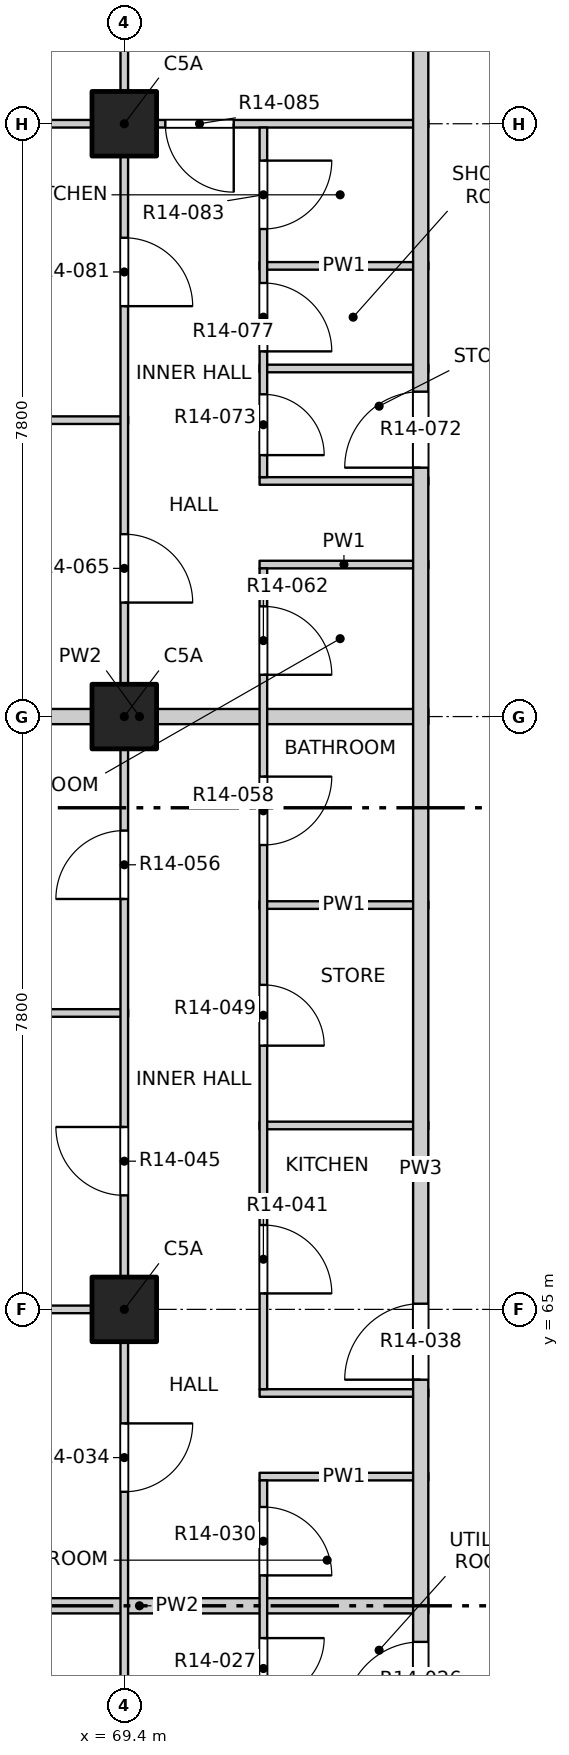
"""IFC4 building model, lengths in metres.
Left out: names, types, materials, properties, quantities, classifications, styles, units other than length and angle.
Written with IfcOpenShell. Run it as: python <this file> out.ifc"""

import sys

from ifc_helpers import new_model, si_unit, direction, frame, frame_2d, origin, origin_2d, place, context, subcontext, project, spatial, rectangle, extrude, element, fill, save


model = new_model("IFC4")
c1 = context("Model", 3, precision=1e-05, world=origin(), true_north=direction((0.0, 1.0)))
c2 = subcontext(c1, "Body", "Model", "MODEL_VIEW")
j1 = project(units=[si_unit("LENGTHUNIT", "METRE"), si_unit("PLANEANGLEUNIT", "RADIAN")], contexts=[c1])
p1 = place(None, origin())
s1 = spatial("IfcSite", under=j1, at=p1, CompositionType="ELEMENT")
p2 = place(p1, origin())
s2 = spatial("IfcBuilding", under=s1, at=p2, CompositionType="ELEMENT")
p3 = place(p2, frame((0.0, 0.0, 155.4)))
s3 = spatial("IfcBuildingStorey", under=s2, at=p3, CompositionType="ELEMENT", Elevation=155.4)
for number, where, z_axis, x_axis in (
    (1, (69.4, 65.0, -0.25), (0.0, 0.0, 1.0), (1.0, 0.0, 0.0)),
    (2, (69.4, 72.8, -0.25), (0.0, 0.0, 1.0), (1.0, 0.0, 0.0)),
    (3, (69.4, 80.6, -0.25), (0.0, 0.0, 1.0), (1.0, 0.0, 0.0)),
):
    element("IfcColumn", number, at=place(p3, frame(where, z_axis=z_axis, x_axis=x_axis)), inside=s3, PredefinedType="COLUMN", context=c2, shape_type="SweptSolid", body=[
        extrude(rectangle(XDim=0.85, YDim=0.85, at=origin_2d()), origin(), (0.0, 0.0, 1.0), 3.4),
    ])
p4 = place(p3, frame((65.8, 61.1, 0.0), z_axis=(0.0, 0.0, 1.0), x_axis=(1.0, 0.0, 0.0)))
e4 = element("IfcWall", 4, at=p4, inside=s3, PredefinedType="PARTITIONING", context=c2, shape_type="SweptSolid", body=[
    extrude(rectangle(XDim=7.6, YDim=0.2, at=frame_2d((3.8, 0.0))), origin(), (0.0, 0.0, 1.0), 2.55),
])
for number, where, z_axis, x_axis in (
    (5, (71.18, 62.8, 0.0), (0.0, 0.0, 1.0), (1.0, 0.0, 0.0)),
    (6, (71.18, 63.9, 0.0), (0.0, 0.0, 1.0), (1.0, 0.0, 0.0)),
):
    element("IfcWall", number, at=place(p3, frame(where, z_axis=z_axis, x_axis=x_axis)), inside=s3, PredefinedType="PARTITIONING", context=c2, shape_type="SweptSolid", body=[
        extrude(rectangle(XDim=2.22, YDim=0.1, at=frame_2d((1.11, 0.0))), origin(), (0.0, 0.0, 1.0), 3.15),
    ])
p5 = place(p3, frame((65.8, 65.0, 0.0), z_axis=(0.0, 0.0, 1.0), x_axis=(1.0, 0.0, 0.0)))
e7 = element("IfcWall", 7, at=p5, inside=s3, PredefinedType="PARTITIONING", context=c2, shape_type="SweptSolid", body=[
    extrude(rectangle(XDim=3.65, YDim=0.1, at=frame_2d((1.825, 0.0))), origin(), (0.0, 0.0, 1.0), 3.15),
])
p6 = place(p3, frame((71.18, 67.42, 0.0), z_axis=(0.0, 0.0, 1.0), x_axis=(1.0, 0.0, 0.0)))
e8 = element("IfcWall", 8, at=p6, inside=s3, PredefinedType="PARTITIONING", context=c2, shape_type="SweptSolid", body=[
    extrude(rectangle(XDim=2.22, YDim=0.1, at=frame_2d((1.11, 0.0))), origin(), (0.0, 0.0, 1.0), 3.15),
])
p7 = place(p3, frame((65.8, 68.9, 0.0), z_axis=(0.0, 0.0, 1.0), x_axis=(1.0, 0.0, 0.0)))
e9 = element("IfcWall", 9, at=p7, inside=s3, PredefinedType="PARTITIONING", context=c2, shape_type="SweptSolid", body=[
    extrude(rectangle(XDim=3.65, YDim=0.1, at=frame_2d((1.825, 0.0))), origin(), (0.0, 0.0, 1.0), 2.55),
])
p8 = place(p3, frame((71.18, 70.32, 0.0), z_axis=(0.0, 0.0, 1.0), x_axis=(1.0, 0.0, 0.0)))
e10 = element("IfcWall", 10, at=p8, inside=s3, PredefinedType="PARTITIONING", context=c2, shape_type="SweptSolid", body=[
    extrude(rectangle(XDim=2.22, YDim=0.1, at=frame_2d((1.11, 0.0))), origin(), (0.0, 0.0, 1.0), 3.15),
])
p9 = place(p3, frame((65.8, 72.8, 0.0), z_axis=(0.0, 0.0, 1.0), x_axis=(1.0, 0.0, 0.0)))
e11 = element("IfcWall", 11, at=p9, inside=s3, PredefinedType="PARTITIONING", context=c2, shape_type="SweptSolid", body=[
    extrude(rectangle(XDim=7.6, YDim=0.2, at=frame_2d((3.8, 0.0))), origin(), (0.0, 0.0, 1.0), 3.15),
])
for number, where, z_axis, x_axis in (
    (12, (71.18, 74.8, 0.0), (0.0, 0.0, 1.0), (1.0, 0.0, 0.0)),
    (13, (71.18, 75.9, 0.0), (0.0, 0.0, 1.0), (1.0, 0.0, 0.0)),
):
    element("IfcWall", number, at=place(p3, frame(where, z_axis=z_axis, x_axis=x_axis)), inside=s3, PredefinedType="PARTITIONING", context=c2, shape_type="SweptSolid", body=[
        extrude(rectangle(XDim=2.22, YDim=0.1, at=frame_2d((1.11, 0.0))), origin(), (0.0, 0.0, 1.0), 3.15),
    ])
p10 = place(p3, frame((65.8, 76.7, 0.0), z_axis=(0.0, 0.0, 1.0), x_axis=(1.0, 0.0, 0.0)))
e14 = element("IfcWall", 14, at=p10, inside=s3, PredefinedType="PARTITIONING", context=c2, shape_type="SweptSolid", body=[
    extrude(rectangle(XDim=3.65, YDim=0.1, at=frame_2d((1.825, 0.0))), origin(), (0.0, 0.0, 1.0), 2.55),
])
for number, where, z_axis, x_axis in (
    (15, (71.18, 77.38, 0.0), (0.0, 0.0, 1.0), (1.0, 0.0, 0.0)),
    (16, (71.18, 78.73, 0.0), (0.0, 0.0, 1.0), (1.0, 0.0, 0.0)),
):
    element("IfcWall", number, at=place(p3, frame(where, z_axis=z_axis, x_axis=x_axis)), inside=s3, PredefinedType="PARTITIONING", context=c2, shape_type="SweptSolid", body=[
        extrude(rectangle(XDim=2.22, YDim=0.1, at=frame_2d((1.11, 0.0))), origin(), (0.0, 0.0, 1.0), 3.15),
    ])
p11 = place(p3, frame((65.8, 80.6, 0.0), z_axis=(0.0, 0.0, 1.0), x_axis=(1.0, 0.0, 0.0)))
e17 = element("IfcWall", 17, at=p11, inside=s3, PredefinedType="PARTITIONING", context=c2, shape_type="SweptSolid", body=[
    extrude(rectangle(XDim=7.6, YDim=0.1, at=frame_2d((3.8, 0.0))), origin(), (0.0, 0.0, 1.0), 3.15),
])
p12 = place(p11, frame((4.14, 0.0, 0.0)))
e18 = element("IfcOpeningElement", 18, at=p12, cuts=e17, PredefinedType="OPENING", context=c2, shape_type="SweptSolid", body=[
    extrude(rectangle(XDim=0.9, YDim=2.1, at=frame_2d((0.45, 1.05))), frame((0.0, 0.06, 0.0), z_axis=(0.0, -1.0, 0.0), x_axis=(1.0, 0.0, 0.0)), (0.0, 0.0, 1.0), 0.12),
])
p13 = place(p3, frame((69.4, 45.8, 0.0), z_axis=(0.0, 0.0, 1.0), x_axis=(0.0, 1.0, 0.0)))
e19 = element("IfcWall", 19, at=p13, inside=s3, PredefinedType="PARTITIONING", context=c2, shape_type="SweptSolid", body=[
    extrude(rectangle(XDim=38.4, YDim=0.1, at=frame_2d((19.2, 0.0))), origin(), (0.0, 0.0, 1.0), 3.15),
])
p14 = place(p13, frame((1.05, 0.0, 0.0)))
e20 = element("IfcOpeningElement", 20, at=p14, cuts=e19, PredefinedType="OPENING", context=c2, shape_type="SweptSolid", body=[
    extrude(rectangle(XDim=1.2, YDim=2.1, at=frame_2d((0.6, 1.05))), frame((0.0, 0.06, 0.0), z_axis=(0.0, -1.0, 0.0), x_axis=(1.0, 0.0, 0.0)), (0.0, 0.0, 1.0), 0.12),
])
p15 = place(p13, frame((6.9, 0.0, 0.0)))
e21 = element("IfcOpeningElement", 21, at=p15, cuts=e19, PredefinedType="OPENING", context=c2, shape_type="SweptSolid", body=[
    extrude(rectangle(XDim=1.2, YDim=2.1, at=frame_2d((0.6, 1.05))), frame((0.0, 0.06, 0.0), z_axis=(0.0, -1.0, 0.0), x_axis=(1.0, 0.0, 0.0)), (0.0, 0.0, 1.0), 0.12),
])
p16 = place(p13, frame((12.9, 0.0, 0.0)))
e22 = element("IfcOpeningElement", 22, at=p16, cuts=e19, PredefinedType="OPENING", context=c2, shape_type="SweptSolid", body=[
    extrude(rectangle(XDim=0.9, YDim=2.1, at=frame_2d((0.45, 1.05))), frame((0.0, 0.06, 0.0), z_axis=(0.0, -1.0, 0.0), x_axis=(1.0, 0.0, 0.0)), (0.0, 0.0, 1.0), 0.12),
])
p17 = place(p13, frame((16.8, 0.0, 0.0)))
e23 = element("IfcOpeningElement", 23, at=p17, cuts=e19, PredefinedType="OPENING", context=c2, shape_type="SweptSolid", body=[
    extrude(rectangle(XDim=0.9, YDim=2.1, at=frame_2d((0.45, 1.05))), frame((0.0, 0.06, 0.0), z_axis=(0.0, -1.0, 0.0), x_axis=(1.0, 0.0, 0.0)), (0.0, 0.0, 1.0), 0.12),
])
p18 = place(p13, frame((20.7, 0.0, 0.0)))
e24 = element("IfcOpeningElement", 24, at=p18, cuts=e19, PredefinedType="OPENING", context=c2, shape_type="SweptSolid", body=[
    extrude(rectangle(XDim=0.9, YDim=2.1, at=frame_2d((0.45, 1.05))), frame((0.0, 0.06, 0.0), z_axis=(0.0, -1.0, 0.0), x_axis=(1.0, 0.0, 0.0)), (0.0, 0.0, 1.0), 0.12),
])
p19 = place(p13, frame((24.6, 0.0, 0.0)))
e25 = element("IfcOpeningElement", 25, at=p19, cuts=e19, PredefinedType="OPENING", context=c2, shape_type="SweptSolid", body=[
    extrude(rectangle(XDim=0.9, YDim=2.1, at=frame_2d((0.45, 1.05))), frame((0.0, 0.06, 0.0), z_axis=(0.0, -1.0, 0.0), x_axis=(1.0, 0.0, 0.0)), (0.0, 0.0, 1.0), 0.12),
])
p20 = place(p13, frame((28.5, 0.0, 0.0)))
e26 = element("IfcOpeningElement", 26, at=p20, cuts=e19, PredefinedType="OPENING", context=c2, shape_type="SweptSolid", body=[
    extrude(rectangle(XDim=0.9, YDim=2.1, at=frame_2d((0.45, 1.05))), frame((0.0, 0.06, 0.0), z_axis=(0.0, -1.0, 0.0), x_axis=(1.0, 0.0, 0.0)), (0.0, 0.0, 1.0), 0.12),
])
p21 = place(p13, frame((32.4, 0.0, 0.0)))
e27 = element("IfcOpeningElement", 27, at=p21, cuts=e19, PredefinedType="OPENING", context=c2, shape_type="SweptSolid", body=[
    extrude(rectangle(XDim=0.9, YDim=2.1, at=frame_2d((0.45, 1.05))), frame((0.0, 0.06, 0.0), z_axis=(0.0, -1.0, 0.0), x_axis=(1.0, 0.0, 0.0)), (0.0, 0.0, 1.0), 0.12),
])
p22 = place(p13, frame((36.15, 0.0, 0.0)))
e28 = element("IfcOpeningElement", 28, at=p22, cuts=e19, PredefinedType="OPENING", context=c2, shape_type="SweptSolid", body=[
    extrude(rectangle(XDim=1.2, YDim=2.1, at=frame_2d((0.6, 1.05))), frame((0.0, 0.06, 0.0), z_axis=(0.0, -1.0, 0.0), x_axis=(1.0, 0.0, 0.0)), (0.0, 0.0, 1.0), 0.12),
])
p23 = place(p3, frame((71.23, 59.5, 0.0), z_axis=(0.0, 0.0, 1.0), x_axis=(0.0, 1.0, 0.0)))
e29 = element("IfcWall", 29, at=p23, inside=s3, PredefinedType="PARTITIONING", context=c2, shape_type="SweptSolid", body=[
    extrude(rectangle(XDim=3.25, YDim=0.1, at=frame_2d((1.625, 0.0))), origin(), (0.0, 0.0, 1.0), 3.15),
])
p24 = place(p23, frame((0.375, 0.0, 0.0)))
e30 = element("IfcOpeningElement", 30, at=p24, cuts=e29, PredefinedType="OPENING", context=c2, shape_type="SweptSolid", body=[
    extrude(rectangle(XDim=0.8, YDim=2.1, at=frame_2d((0.4, 1.05))), frame((0.0, 0.06, 0.0), z_axis=(0.0, -1.0, 0.0), x_axis=(1.0, 0.0, 0.0)), (0.0, 0.0, 1.0), 0.12),
])
p25 = place(p23, frame((2.0, 0.0, 0.0)))
e31 = element("IfcOpeningElement", 31, at=p25, cuts=e29, PredefinedType="OPENING", context=c2, shape_type="SweptSolid", body=[
    extrude(rectangle(XDim=0.9, YDim=2.1, at=frame_2d((0.45, 1.05))), frame((0.0, 0.06, 0.0), z_axis=(0.0, -1.0, 0.0), x_axis=(1.0, 0.0, 0.0)), (0.0, 0.0, 1.0), 0.12),
])
p26 = place(p3, frame((71.23, 63.95, 0.0), z_axis=(0.0, 0.0, 1.0), x_axis=(0.0, 1.0, 0.0)))
e32 = element("IfcWall", 32, at=p26, inside=s3, PredefinedType="PARTITIONING", context=c2, shape_type="SweptSolid", body=[
    extrude(rectangle(XDim=10.8, YDim=0.1, at=frame_2d((5.4, 0.0))), origin(), (0.0, 0.0, 1.0), 3.15),
])
p27 = place(p26, frame((1.26, 0.0, 0.0)))
e33 = element("IfcOpeningElement", 33, at=p27, cuts=e32, PredefinedType="OPENING", context=c2, shape_type="SweptSolid", body=[
    extrude(rectangle(XDim=0.9, YDim=2.1, at=frame_2d((0.45, 1.05))), frame((0.0, 0.06, 0.0), z_axis=(0.0, -1.0, 0.0), x_axis=(1.0, 0.0, 0.0)), (0.0, 0.0, 1.0), 0.12),
])
p28 = place(p26, frame((4.52, 0.0, 0.0)))
e34 = element("IfcOpeningElement", 34, at=p28, cuts=e32, PredefinedType="OPENING", context=c2, shape_type="SweptSolid", body=[
    extrude(rectangle(XDim=0.8, YDim=2.1, at=frame_2d((0.4, 1.05))), frame((0.0, 0.06, 0.0), z_axis=(0.0, -1.0, 0.0), x_axis=(1.0, 0.0, 0.0)), (0.0, 0.0, 1.0), 0.12),
])
p29 = place(p26, frame((7.16, 0.0, 0.0)))
e35 = element("IfcOpeningElement", 35, at=p29, cuts=e32, PredefinedType="OPENING", context=c2, shape_type="SweptSolid", body=[
    extrude(rectangle(XDim=0.9, YDim=2.1, at=frame_2d((0.45, 1.05))), frame((0.0, 0.06, 0.0), z_axis=(0.0, -1.0, 0.0), x_axis=(1.0, 0.0, 0.0)), (0.0, 0.0, 1.0), 0.12),
])
p30 = place(p26, frame((9.4, 0.0, 0.0)))
e36 = element("IfcOpeningElement", 36, at=p30, cuts=e32, PredefinedType="OPENING", context=c2, shape_type="SweptSolid", body=[
    extrude(rectangle(XDim=0.9, YDim=2.1, at=frame_2d((0.45, 1.05))), frame((0.0, 0.06, 0.0), z_axis=(0.0, -1.0, 0.0), x_axis=(1.0, 0.0, 0.0)), (0.0, 0.0, 1.0), 0.12),
])
p31 = place(p3, frame((71.23, 75.95, 0.0), z_axis=(0.0, 0.0, 1.0), x_axis=(0.0, 1.0, 0.0)))
e37 = element("IfcWall", 37, at=p31, inside=s3, PredefinedType="PARTITIONING", context=c2, shape_type="SweptSolid", body=[
    extrude(rectangle(XDim=4.6, YDim=0.1, at=frame_2d((2.3, 0.0))), origin(), (0.0, 0.0, 1.0), 3.15),
])
p32 = place(p31, frame((0.29, 0.0, 0.0)))
e38 = element("IfcOpeningElement", 38, at=p32, cuts=e37, PredefinedType="OPENING", context=c2, shape_type="SweptSolid", body=[
    extrude(rectangle(XDim=0.8, YDim=2.1, at=frame_2d((0.4, 1.05))), frame((0.0, 0.06, 0.0), z_axis=(0.0, -1.0, 0.0), x_axis=(1.0, 0.0, 0.0)), (0.0, 0.0, 1.0), 0.12),
])
p33 = place(p31, frame((1.655, 0.0, 0.0)))
e39 = element("IfcOpeningElement", 39, at=p33, cuts=e37, PredefinedType="OPENING", context=c2, shape_type="SweptSolid", body=[
    extrude(rectangle(XDim=0.9, YDim=2.1, at=frame_2d((0.45, 1.05))), frame((0.0, 0.06, 0.0), z_axis=(0.0, -1.0, 0.0), x_axis=(1.0, 0.0, 0.0)), (0.0, 0.0, 1.0), 0.12),
])
p34 = place(p31, frame((3.265, 0.0, 0.0)))
e40 = element("IfcOpeningElement", 40, at=p34, cuts=e37, PredefinedType="OPENING", context=c2, shape_type="SweptSolid", body=[
    extrude(rectangle(XDim=0.9, YDim=2.1, at=frame_2d((0.45, 1.05))), frame((0.0, 0.06, 0.0), z_axis=(0.0, -1.0, 0.0), x_axis=(1.0, 0.0, 0.0)), (0.0, 0.0, 1.0), 0.12),
])
p35 = place(p3, frame((73.3, 49.5, 0.0), z_axis=(0.0, 0.0, 1.0), x_axis=(0.0, 1.0, 0.0)))
e41 = element("IfcWall", 41, at=p35, inside=s3, PredefinedType="PARTITIONING", context=c2, shape_type="SweptSolid", body=[
    extrude(rectangle(XDim=34.7, YDim=0.2, at=frame_2d((17.35, 0.0))), origin(), (0.0, 0.0, 1.0), 3.15),
])
p36 = place(p35, frame((10.125, 0.0, 0.0)))
e42 = element("IfcOpeningElement", 42, at=p36, cuts=e41, PredefinedType="OPENING", context=c2, shape_type="SweptSolid", body=[
    extrude(rectangle(XDim=1.0, YDim=2.1, at=frame_2d((0.5, 1.05))), frame((0.0, 0.11, 0.0), z_axis=(0.0, -1.0, 0.0), x_axis=(1.0, 0.0, 0.0)), (0.0, 0.0, 1.0), 0.22),
])
p37 = place(p35, frame((14.575, 0.0, 0.0)))
e43 = element("IfcOpeningElement", 43, at=p37, cuts=e41, PredefinedType="OPENING", context=c2, shape_type="SweptSolid", body=[
    extrude(rectangle(XDim=1.0, YDim=2.1, at=frame_2d((0.5, 1.05))), frame((0.0, 0.11, 0.0), z_axis=(0.0, -1.0, 0.0), x_axis=(1.0, 0.0, 0.0)), (0.0, 0.0, 1.0), 0.22),
])
p38 = place(p35, frame((26.575, 0.0, 0.0)))
e44 = element("IfcOpeningElement", 44, at=p38, cuts=e41, PredefinedType="OPENING", context=c2, shape_type="SweptSolid", body=[
    extrude(rectangle(XDim=1.0, YDim=2.1, at=frame_2d((0.5, 1.05))), frame((0.0, 0.11, 0.0), z_axis=(0.0, -1.0, 0.0), x_axis=(1.0, 0.0, 0.0)), (0.0, 0.0, 1.0), 0.22),
])
p39 = place(p36, origin())
e45 = element("IfcDoor", 45, at=p39, inside=s3, OperationType="SINGLE_SWING_RIGHT", PredefinedType="DOOR", context=c2, shape_type="SweptSolid", body=[
    extrude(rectangle(XDim=1.0, YDim=2.1, at=frame_2d((0.5, 1.05))), frame((0.0, 0.025, 0.0), z_axis=(0.0, -1.0, 0.0), x_axis=(1.0, 0.0, 0.0)), (0.0, 0.0, 1.0), 0.05),
])
fill(e42, e45)
p40 = place(p24, origin())
e46 = element("IfcDoor", 46, at=p40, inside=s3, OperationType="SINGLE_SWING_LEFT", PredefinedType="DOOR", context=c2, shape_type="SweptSolid", body=[
    extrude(rectangle(XDim=0.8, YDim=2.1, at=frame_2d((0.4, 1.05))), frame((0.0, 0.025, 0.0), z_axis=(0.0, -1.0, 0.0), x_axis=(1.0, 0.0, 0.0)), (0.0, 0.0, 1.0), 0.05),
])
fill(e30, e46)
p41 = place(p25, origin())
e47 = element("IfcDoor", 47, at=p41, inside=s3, OperationType="SINGLE_SWING_RIGHT", PredefinedType="DOOR", context=c2, shape_type="SweptSolid", body=[
    extrude(rectangle(XDim=0.9, YDim=2.1, at=frame_2d((0.45, 1.05))), frame((0.0, 0.025, 0.0), z_axis=(0.0, -1.0, 0.0), x_axis=(1.0, 0.0, 0.0)), (0.0, 0.0, 1.0), 0.05),
])
fill(e31, e47)
p42 = place(p17, origin())
e48 = element("IfcDoor", 48, at=p42, inside=s3, OperationType="SINGLE_SWING_LEFT", PredefinedType="DOOR", context=c2, shape_type="SweptSolid", body=[
    extrude(rectangle(XDim=0.9, YDim=2.1, at=frame_2d((0.45, 1.05))), frame((0.0, 0.025, 0.0), z_axis=(0.0, -1.0, 0.0), x_axis=(1.0, 0.0, 0.0)), (0.0, 0.0, 1.0), 0.05),
])
fill(e23, e48)
p43 = place(p37, origin())
e49 = element("IfcDoor", 49, at=p43, inside=s3, OperationType="SINGLE_SWING_RIGHT", PredefinedType="DOOR", context=c2, shape_type="SweptSolid", body=[
    extrude(rectangle(XDim=1.0, YDim=2.1, at=frame_2d((0.5, 1.05))), frame((0.0, 0.025, 0.0), z_axis=(0.0, -1.0, 0.0), x_axis=(1.0, 0.0, 0.0)), (0.0, 0.0, 1.0), 0.05),
])
fill(e43, e49)
p44 = place(p27, origin())
e50 = element("IfcDoor", 50, at=p44, inside=s3, OperationType="SINGLE_SWING_RIGHT", PredefinedType="DOOR", context=c2, shape_type="SweptSolid", body=[
    extrude(rectangle(XDim=0.9, YDim=2.1, at=frame_2d((0.45, 1.05))), frame((0.0, 0.025, 0.0), z_axis=(0.0, -1.0, 0.0), x_axis=(1.0, 0.0, 0.0)), (0.0, 0.0, 1.0), 0.05),
])
fill(e33, e50)
p45 = place(p18, origin())
e51 = element("IfcDoor", 51, at=p45, inside=s3, OperationType="SINGLE_SWING_RIGHT", PredefinedType="DOOR", context=c2, shape_type="SweptSolid", body=[
    extrude(rectangle(XDim=0.9, YDim=2.1, at=frame_2d((0.45, 1.05))), frame((0.0, 0.025, 0.0), z_axis=(0.0, -1.0, 0.0), x_axis=(1.0, 0.0, 0.0)), (0.0, 0.0, 1.0), 0.05),
])
fill(e24, e51)
p46 = place(p28, origin())
e52 = element("IfcDoor", 52, at=p46, inside=s3, OperationType="SINGLE_SWING_RIGHT", PredefinedType="DOOR", context=c2, shape_type="SweptSolid", body=[
    extrude(rectangle(XDim=0.8, YDim=2.1, at=frame_2d((0.4, 1.05))), frame((0.0, 0.025, 0.0), z_axis=(0.0, -1.0, 0.0), x_axis=(1.0, 0.0, 0.0)), (0.0, 0.0, 1.0), 0.05),
])
fill(e34, e52)
p47 = place(p19, origin())
e53 = element("IfcDoor", 53, at=p47, inside=s3, OperationType="SINGLE_SWING_LEFT", PredefinedType="DOOR", context=c2, shape_type="SweptSolid", body=[
    extrude(rectangle(XDim=0.9, YDim=2.1, at=frame_2d((0.45, 1.05))), frame((0.0, 0.025, 0.0), z_axis=(0.0, -1.0, 0.0), x_axis=(1.0, 0.0, 0.0)), (0.0, 0.0, 1.0), 0.05),
])
fill(e25, e53)
p48 = place(p29, origin())
e54 = element("IfcDoor", 54, at=p48, inside=s3, OperationType="SINGLE_SWING_LEFT", PredefinedType="DOOR", context=c2, shape_type="SweptSolid", body=[
    extrude(rectangle(XDim=0.9, YDim=2.1, at=frame_2d((0.45, 1.05))), frame((0.0, 0.025, 0.0), z_axis=(0.0, -1.0, 0.0), x_axis=(1.0, 0.0, 0.0)), (0.0, 0.0, 1.0), 0.05),
])
fill(e35, e54)
p49 = place(p30, origin())
e55 = element("IfcDoor", 55, at=p49, inside=s3, OperationType="SINGLE_SWING_RIGHT", PredefinedType="DOOR", context=c2, shape_type="SweptSolid", body=[
    extrude(rectangle(XDim=0.9, YDim=2.1, at=frame_2d((0.45, 1.05))), frame((0.0, 0.025, 0.0), z_axis=(0.0, -1.0, 0.0), x_axis=(1.0, 0.0, 0.0)), (0.0, 0.0, 1.0), 0.05),
])
fill(e36, e55)
p50 = place(p20, origin())
e56 = element("IfcDoor", 56, at=p50, inside=s3, OperationType="SINGLE_SWING_RIGHT", PredefinedType="DOOR", context=c2, shape_type="SweptSolid", body=[
    extrude(rectangle(XDim=0.9, YDim=2.1, at=frame_2d((0.45, 1.05))), frame((0.0, 0.025, 0.0), z_axis=(0.0, -1.0, 0.0), x_axis=(1.0, 0.0, 0.0)), (0.0, 0.0, 1.0), 0.05),
])
fill(e26, e56)
p51 = place(p38, origin())
e57 = element("IfcDoor", 57, at=p51, inside=s3, OperationType="SINGLE_SWING_RIGHT", PredefinedType="DOOR", context=c2, shape_type="SweptSolid", body=[
    extrude(rectangle(XDim=1.0, YDim=2.1, at=frame_2d((0.5, 1.05))), frame((0.0, 0.025, 0.0), z_axis=(0.0, -1.0, 0.0), x_axis=(1.0, 0.0, 0.0)), (0.0, 0.0, 1.0), 0.05),
])
fill(e44, e57)
p52 = place(p32, origin())
e58 = element("IfcDoor", 58, at=p52, inside=s3, OperationType="SINGLE_SWING_RIGHT", PredefinedType="DOOR", context=c2, shape_type="SweptSolid", body=[
    extrude(rectangle(XDim=0.8, YDim=2.1, at=frame_2d((0.4, 1.05))), frame((0.0, 0.025, 0.0), z_axis=(0.0, -1.0, 0.0), x_axis=(1.0, 0.0, 0.0)), (0.0, 0.0, 1.0), 0.05),
])
fill(e38, e58)
p53 = place(p33, origin())
e59 = element("IfcDoor", 59, at=p53, inside=s3, OperationType="SINGLE_SWING_RIGHT", PredefinedType="DOOR", context=c2, shape_type="SweptSolid", body=[
    extrude(rectangle(XDim=0.9, YDim=2.1, at=frame_2d((0.45, 1.05))), frame((0.0, 0.025, 0.0), z_axis=(0.0, -1.0, 0.0), x_axis=(1.0, 0.0, 0.0)), (0.0, 0.0, 1.0), 0.05),
])
fill(e39, e59)
p54 = place(p21, origin())
e60 = element("IfcDoor", 60, at=p54, inside=s3, OperationType="SINGLE_SWING_RIGHT", PredefinedType="DOOR", context=c2, shape_type="SweptSolid", body=[
    extrude(rectangle(XDim=0.9, YDim=2.1, at=frame_2d((0.45, 1.05))), frame((0.0, 0.025, 0.0), z_axis=(0.0, -1.0, 0.0), x_axis=(1.0, 0.0, 0.0)), (0.0, 0.0, 1.0), 0.05),
])
fill(e27, e60)
p55 = place(p34, origin())
e61 = element("IfcDoor", 61, at=p55, inside=s3, OperationType="SINGLE_SWING_LEFT", PredefinedType="DOOR", context=c2, shape_type="SweptSolid", body=[
    extrude(rectangle(XDim=0.9, YDim=2.1, at=frame_2d((0.45, 1.05))), frame((0.0, 0.025, 0.0), z_axis=(0.0, -1.0, 0.0), x_axis=(1.0, 0.0, 0.0)), (0.0, 0.0, 1.0), 0.05),
])
fill(e40, e61)
p56 = place(p12, origin())
e62 = element("IfcDoor", 62, at=p56, inside=s3, OperationType="SINGLE_SWING_LEFT", PredefinedType="DOOR", context=c2, shape_type="SweptSolid", body=[
    extrude(rectangle(XDim=0.9, YDim=2.1, at=frame_2d((0.45, 1.05))), frame((0.0, 0.025, 0.0), z_axis=(0.0, -1.0, 0.0), x_axis=(1.0, 0.0, 0.0)), (0.0, 0.0, 1.0), 0.05),
])
fill(e18, e62)
save(model, sys.argv[1])
